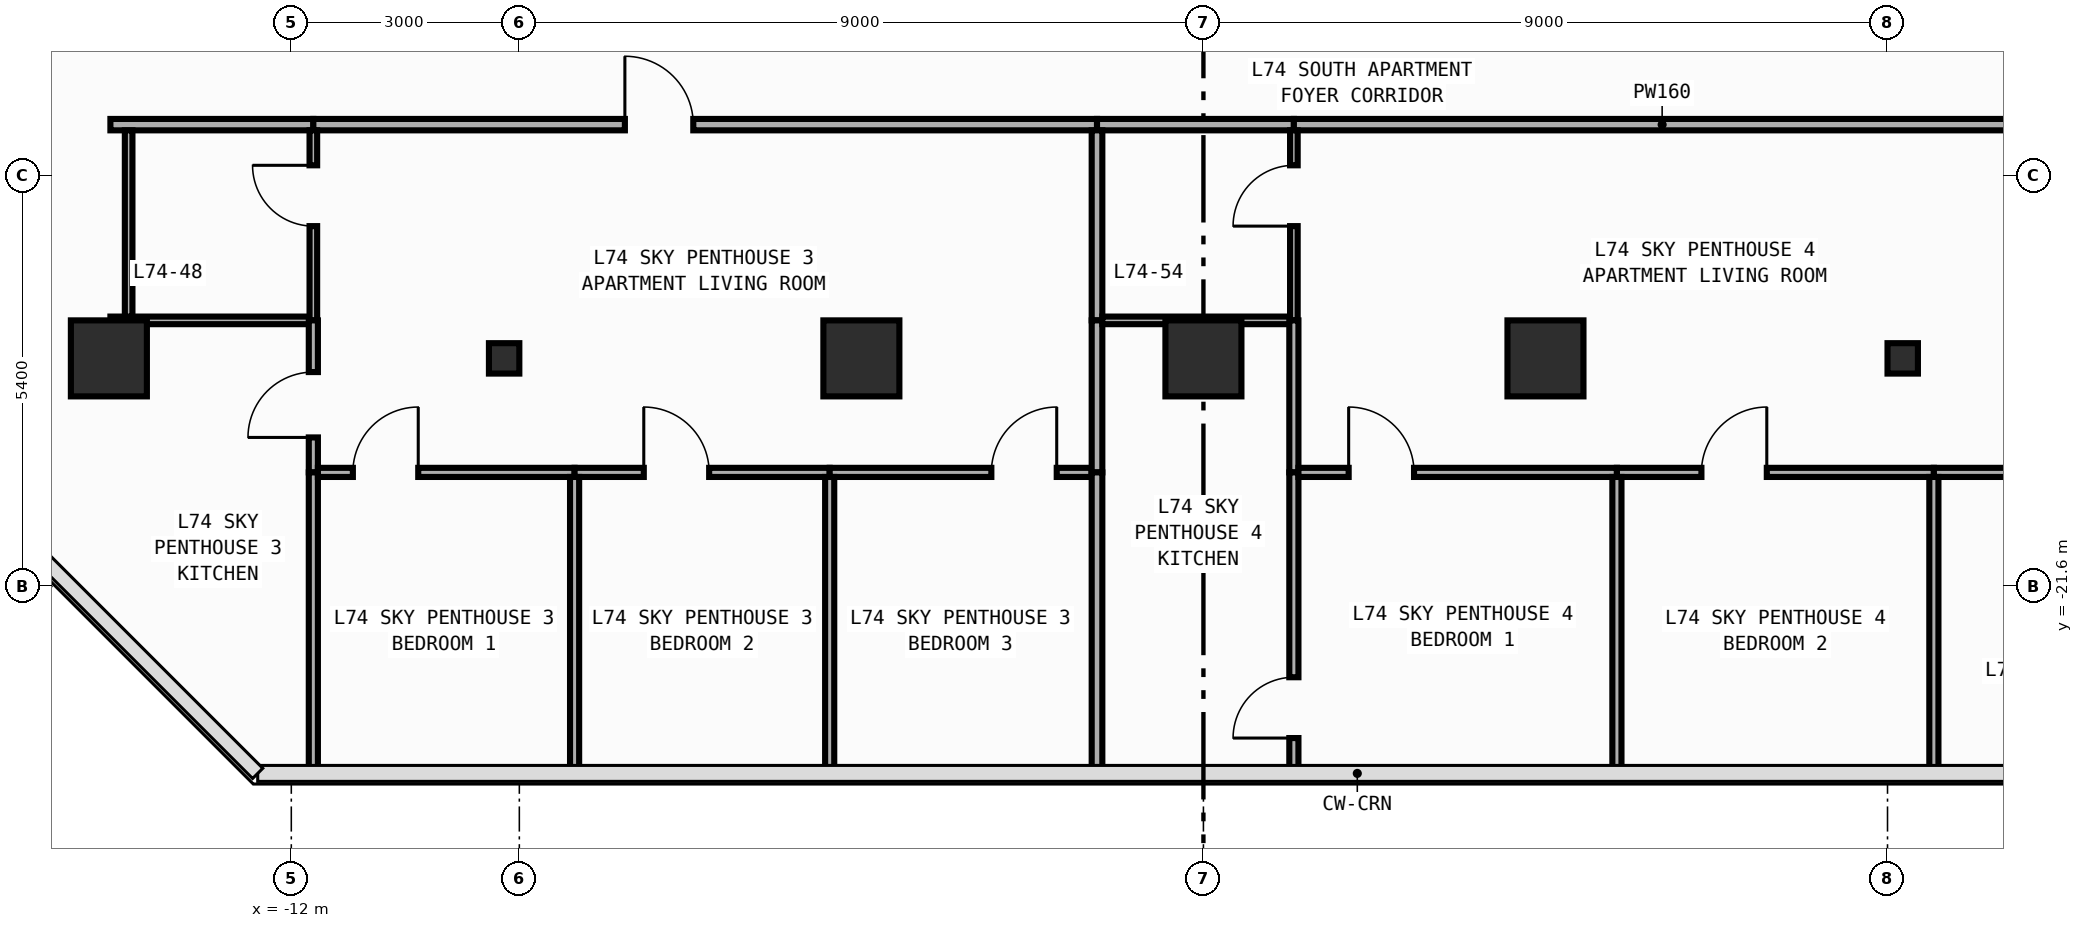
"""IFC4 building model, lengths in metres.
Left out: names, types, materials, properties, quantities, classifications, styles, units other than length and angle.
Written with IfcOpenShell. Run it as: python <this file> out.ifc"""

import sys

from ifc_helpers import new_model, si_unit, direction, frame, frame_2d, origin, origin_2d, place, context, subcontext, project, spatial, rectangle, circle, i_section, extrude, element, fill, save


model = new_model("IFC4")
c1 = context("Model", 3, precision=1e-05, world=origin(), true_north=direction((0.0, 1.0)))
c2 = subcontext(c1, "Body", "Model", "MODEL_VIEW")
j1 = project(units=[si_unit("LENGTHUNIT", "METRE"), si_unit("PLANEANGLEUNIT", "RADIAN")], contexts=[c1])
p1 = place(None, origin())
s1 = spatial("IfcSite", under=j1, at=p1, CompositionType="ELEMENT")
p2 = place(p1, origin())
s2 = spatial("IfcBuilding", under=s1, at=p2, CompositionType="ELEMENT")
p3 = place(p2, frame((0.0, 0.0, 308.0)))
s3 = spatial("IfcBuildingStorey", under=s2, at=p3, CompositionType="ELEMENT", Elevation=308.0)
for number, where, z_axis, x_axis in (
    (1, (-9.2, -18.6, 0.0), (0.0, 0.0, 1.0), (1.0, 0.0, 0.0)),
    (2, (9.2, -18.6, 0.0), (0.0, 0.0, 1.0), (1.0, 0.0, 0.0)),
):
    element("IfcColumn", number, at=place(p3, frame(where, z_axis=z_axis, x_axis=x_axis)), inside=s3, PredefinedType="COLUMN", context=c2, shape_type="SweptSolid", body=[
        extrude(i_section(OverallWidth=0.4, OverallDepth=0.4, WebThickness=0.013, FlangeThickness=0.021, FilletRadius=0.022, at=origin_2d()), origin(), (0.0, 0.0, 1.0), 3.8),
    ])
for number, where, z_axis, x_axis in (
    (3, (-14.4, -18.6, 0.0), (0.0, 0.0, 1.0), (1.0, 0.0, 0.0)),
    (4, (-4.5, -18.6, 0.0), (0.0, 0.0, 1.0), (1.0, 0.0, 0.0)),
    (5, (0.0, -18.6, 0.0), (0.0, 0.0, 1.0), (1.0, 0.0, 0.0)),
    (6, (4.5, -18.6, 0.0), (0.0, 0.0, 1.0), (1.0, 0.0, 0.0)),
):
    element("IfcColumn", number, at=place(p3, frame(where, z_axis=z_axis, x_axis=x_axis)), inside=s3, PredefinedType="COLUMN", context=c2, shape_type="SweptSolid", body=[
        extrude(circle(Radius=0.5, at=origin_2d()), origin(), (0.0, 0.0, 1.0), 3.8),
    ])
p4 = place(p3, frame((-14.38, -15.525, 0.0), z_axis=(0.0, 0.0, 1.0), x_axis=(1.0, 0.0, 0.0)))
e7 = element("IfcWall", 7, at=p4, inside=s3, PredefinedType="PARTITIONING", context=c2, shape_type="SweptSolid", body=[
    extrude(rectangle(XDim=2.67, YDim=0.15, at=frame_2d((1.335, 0.0))), origin(), (0.0, 0.0, 1.0), 3.54),
])
p5 = place(p3, frame((-11.71, -15.525, 0.0), z_axis=(0.0, 0.0, 1.0), x_axis=(1.0, 0.0, 0.0)))
e8 = element("IfcWall", 8, at=p5, inside=s3, PredefinedType="PARTITIONING", context=c2, shape_type="SweptSolid", body=[
    extrude(rectangle(XDim=10.31, YDim=0.15, at=frame_2d((5.155, 0.0))), origin(), (0.0, 0.0, 1.0), 3.54),
])
p6 = place(p5, frame((4.099, 0.0, 0.0)))
e9 = element("IfcOpeningElement", 9, at=p6, cuts=e8, PredefinedType="OPENING", context=c2, shape_type="SweptSolid", body=[
    extrude(rectangle(XDim=0.9, YDim=2.15, at=frame_2d((0.45, 1.075))), frame((0.0, 0.085, 0.0), z_axis=(0.0, -1.0, 0.0), x_axis=(1.0, 0.0, 0.0)), (0.0, 0.0, 1.0), 0.17),
])
p7 = place(p3, frame((-1.4, -15.525, 0.0), z_axis=(0.0, 0.0, 1.0), x_axis=(1.0, 0.0, 0.0)))
e10 = element("IfcWall", 10, at=p7, inside=s3, PredefinedType="PARTITIONING", context=c2, shape_type="SweptSolid", body=[
    extrude(rectangle(XDim=2.59, YDim=0.15, at=frame_2d((1.295, 0.0))), origin(), (0.0, 0.0, 1.0), 3.54),
])
p8 = place(p3, frame((1.19, -15.525, 0.0), z_axis=(0.0, 0.0, 1.0), x_axis=(1.0, 0.0, 0.0)))
e11 = element("IfcWall", 11, at=p8, inside=s3, PredefinedType="PARTITIONING", context=c2, shape_type="SweptSolid", body=[
    extrude(rectangle(XDim=11.05, YDim=0.15, at=frame_2d((5.525, 0.0))), origin(), (0.0, 0.0, 1.0), 3.54),
])
p9 = place(p8, frame((9.69, 0.0, 0.0)))
e12 = element("IfcOpeningElement", 12, at=p9, cuts=e11, PredefinedType="OPENING", context=c2, shape_type="SweptSolid", body=[
    extrude(rectangle(XDim=0.9, YDim=2.15, at=frame_2d((0.45, 1.075))), frame((0.0, 0.085, 0.0), z_axis=(0.0, -1.0, 0.0), x_axis=(1.0, 0.0, 0.0)), (0.0, 0.0, 1.0), 0.17),
])
p10 = place(p3, frame((-14.38, -18.1, 0.0), z_axis=(0.0, 0.0, 1.0), x_axis=(1.0, 0.0, 0.0)))
e13 = element("IfcWall", 13, at=p10, inside=s3, PredefinedType="PARTITIONING", context=c2, shape_type="SweptSolid", body=[
    extrude(rectangle(XDim=2.62, YDim=0.1, at=frame_2d((1.31, 0.0))), origin(), (0.0, 0.0, 1.0), 3.54),
])
p11 = place(p3, frame((-11.71, -18.1, 0.0), z_axis=(0.0, 0.0, 1.0), x_axis=(0.0, 1.0, 0.0)))
e14 = element("IfcWall", 14, at=p11, inside=s3, PredefinedType="PARTITIONING", context=c2, shape_type="SweptSolid", body=[
    extrude(rectangle(XDim=2.5, YDim=0.1, at=frame_2d((1.25, 0.0))), origin(), (0.0, 0.0, 1.0), 3.54),
])
p12 = place(p11, frame((1.24, 0.0, 0.0)))
e15 = element("IfcOpeningElement", 15, at=p12, cuts=e14, PredefinedType="OPENING", context=c2, shape_type="SweptSolid", body=[
    extrude(rectangle(XDim=0.8, YDim=2.1, at=frame_2d((0.4, 1.05))), frame((0.0, 0.06, 0.0), z_axis=(0.0, -1.0, 0.0), x_axis=(1.0, 0.0, 0.0)), (0.0, 0.0, 1.0), 0.12),
])
p13 = place(p3, frame((-11.71, -20.1, 0.0), z_axis=(0.0, 0.0, 1.0), x_axis=(0.0, 1.0, 0.0)))
e16 = element("IfcWall", 16, at=p13, inside=s3, PredefinedType="PARTITIONING", context=c2, shape_type="SweptSolid", body=[
    extrude(rectangle(XDim=2.0, YDim=0.12, at=frame_2d((1.0, 0.0))), origin(), (0.0, 0.0, 1.0), 3.54),
])
p14 = place(p13, frame((0.46, 0.0, 0.0)))
e17 = element("IfcOpeningElement", 17, at=p14, cuts=e16, PredefinedType="OPENING", context=c2, shape_type="SweptSolid", body=[
    extrude(rectangle(XDim=0.86, YDim=2.15, at=frame_2d((0.43, 1.075))), frame((0.0, 0.07, 0.0), z_axis=(0.0, -1.0, 0.0), x_axis=(1.0, 0.0, 0.0)), (0.0, 0.0, 1.0), 0.14),
])
p15 = place(p3, frame((-11.71, -24.055, 0.0), z_axis=(0.0, 0.0, 1.0), x_axis=(0.0, 1.0, 0.0)))
e18 = element("IfcWall", 18, at=p15, inside=s3, PredefinedType="PARTITIONING", context=c2, shape_type="SweptSolid", body=[
    extrude(rectangle(XDim=3.955, YDim=0.12, at=frame_2d((1.978, 0.0))), origin(), (0.0, 0.0, 1.0), 3.54),
])
p16 = place(p3, frame((-11.65, -20.1, 0.0), z_axis=(0.0, 0.0, 1.0), x_axis=(1.0, 0.0, 0.0)))
e19 = element("IfcWall", 19, at=p16, inside=s3, PredefinedType="PARTITIONING", context=c2, shape_type="SweptSolid", body=[
    extrude(rectangle(XDim=3.377, YDim=0.12, at=frame_2d((1.688, 0.0))), origin(), (0.0, 0.0, 1.0), 3.54),
])
p17 = place(p16, frame((0.46, 0.0, 0.0)))
e20 = element("IfcOpeningElement", 20, at=p17, cuts=e19, PredefinedType="OPENING", context=c2, shape_type="SweptSolid", body=[
    extrude(rectangle(XDim=0.86, YDim=2.15, at=frame_2d((0.43, 1.075))), frame((0.0, 0.07, 0.0), z_axis=(0.0, -1.0, 0.0), x_axis=(1.0, 0.0, 0.0)), (0.0, 0.0, 1.0), 0.14),
])
p18 = place(p3, frame((-8.273, -20.1, 0.0), z_axis=(0.0, 0.0, 1.0), x_axis=(1.0, 0.0, 0.0)))
e21 = element("IfcWall", 21, at=p18, inside=s3, PredefinedType="PARTITIONING", context=c2, shape_type="SweptSolid", body=[
    extrude(rectangle(XDim=3.356, YDim=0.12, at=frame_2d((1.678, 0.0))), origin(), (0.0, 0.0, 1.0), 3.54),
])
p19 = place(p18, frame((0.91, 0.0, 0.0)))
e22 = element("IfcOpeningElement", 22, at=p19, cuts=e21, PredefinedType="OPENING", context=c2, shape_type="SweptSolid", body=[
    extrude(rectangle(XDim=0.86, YDim=2.15, at=frame_2d((0.43, 1.075))), frame((0.0, 0.07, 0.0), z_axis=(0.0, -1.0, 0.0), x_axis=(1.0, 0.0, 0.0)), (0.0, 0.0, 1.0), 0.14),
])
p20 = place(p3, frame((-4.917, -20.1, 0.0), z_axis=(0.0, 0.0, 1.0), x_axis=(1.0, 0.0, 0.0)))
e23 = element("IfcWall", 23, at=p20, inside=s3, PredefinedType="PARTITIONING", context=c2, shape_type="SweptSolid", body=[
    extrude(rectangle(XDim=3.447, YDim=0.12, at=frame_2d((1.724, 0.0))), origin(), (0.0, 0.0, 1.0), 3.54),
])
p21 = place(p20, frame((2.127, 0.0, 0.0)))
e24 = element("IfcOpeningElement", 24, at=p21, cuts=e23, PredefinedType="OPENING", context=c2, shape_type="SweptSolid", body=[
    extrude(rectangle(XDim=0.86, YDim=2.15, at=frame_2d((0.43, 1.075))), frame((0.0, 0.07, 0.0), z_axis=(0.0, -1.0, 0.0), x_axis=(1.0, 0.0, 0.0)), (0.0, 0.0, 1.0), 0.14),
])
p22 = place(p3, frame((-1.4, -18.1, 0.0), z_axis=(0.0, 0.0, 1.0), x_axis=(0.0, 1.0, 0.0)))
e25 = element("IfcWall", 25, at=p22, inside=s3, PredefinedType="PARTITIONING", context=c2, shape_type="SweptSolid", body=[
    extrude(rectangle(XDim=2.5, YDim=0.14, at=frame_2d((1.25, 0.0))), origin(), (0.0, 0.0, 1.0), 3.54),
])
p23 = place(p3, frame((-1.4, -20.1, 0.0), z_axis=(0.0, 0.0, 1.0), x_axis=(0.0, 1.0, 0.0)))
e26 = element("IfcWall", 26, at=p23, inside=s3, PredefinedType="PARTITIONING", context=c2, shape_type="SweptSolid", body=[
    extrude(rectangle(XDim=2.0, YDim=0.14, at=frame_2d((1.0, 0.0))), origin(), (0.0, 0.0, 1.0), 3.54),
])
for number, where, z_axis, x_axis in (
    (27, (-8.273, -24.055, 0.0), (0.0, 0.0, 1.0), (0.0, 1.0, 0.0)),
    (28, (-4.917, -24.055, 0.0), (0.0, 0.0, 1.0), (0.0, 1.0, 0.0)),
):
    element("IfcWall", number, at=place(p3, frame(where, z_axis=z_axis, x_axis=x_axis)), inside=s3, PredefinedType="PARTITIONING", context=c2, shape_type="SweptSolid", body=[
        extrude(rectangle(XDim=3.895, YDim=0.12, at=frame_2d((1.948, 0.0))), origin(), (0.0, 0.0, 1.0), 3.54),
    ])
p24 = place(p3, frame((-1.4, -24.055, 0.0), z_axis=(0.0, 0.0, 1.0), x_axis=(0.0, 1.0, 0.0)))
e29 = element("IfcWall", 29, at=p24, inside=s3, PredefinedType="PARTITIONING", context=c2, shape_type="SweptSolid", body=[
    extrude(rectangle(XDim=3.955, YDim=0.14, at=frame_2d((1.978, 0.0))), origin(), (0.0, 0.0, 1.0), 3.54),
])
p25 = place(p3, frame((-1.33, -18.1, 0.0), z_axis=(0.0, 0.0, 1.0), x_axis=(1.0, 0.0, 0.0)))
e30 = element("IfcWall", 30, at=p25, inside=s3, PredefinedType="PARTITIONING", context=c2, shape_type="SweptSolid", body=[
    extrude(rectangle(XDim=2.47, YDim=0.1, at=frame_2d((1.235, 0.0))), origin(), (0.0, 0.0, 1.0), 3.54),
])
p26 = place(p3, frame((1.19, -18.1, 0.0), z_axis=(0.0, 0.0, 1.0), x_axis=(0.0, 1.0, 0.0)))
e31 = element("IfcWall", 31, at=p26, inside=s3, PredefinedType="PARTITIONING", context=c2, shape_type="SweptSolid", body=[
    extrude(rectangle(XDim=2.5, YDim=0.1, at=frame_2d((1.25, 0.0))), origin(), (0.0, 0.0, 1.0), 3.54),
])
p27 = place(p26, frame((1.24, 0.0, 0.0)))
e32 = element("IfcOpeningElement", 32, at=p27, cuts=e31, PredefinedType="OPENING", context=c2, shape_type="SweptSolid", body=[
    extrude(rectangle(XDim=0.8, YDim=2.1, at=frame_2d((0.4, 1.05))), frame((0.0, 0.06, 0.0), z_axis=(0.0, -1.0, 0.0), x_axis=(1.0, 0.0, 0.0)), (0.0, 0.0, 1.0), 0.12),
])
p28 = place(p3, frame((1.19, -20.1, 0.0), z_axis=(0.0, 0.0, 1.0), x_axis=(0.0, 1.0, 0.0)))
e33 = element("IfcWall", 33, at=p28, inside=s3, PredefinedType="PARTITIONING", context=c2, shape_type="SweptSolid", body=[
    extrude(rectangle(XDim=2.0, YDim=0.12, at=frame_2d((1.0, 0.0))), origin(), (0.0, 0.0, 1.0), 3.54),
])
p29 = place(p3, frame((1.19, -24.055, 0.0), z_axis=(0.0, 0.0, 1.0), x_axis=(0.0, 1.0, 0.0)))
e34 = element("IfcWall", 34, at=p29, inside=s3, PredefinedType="PARTITIONING", context=c2, shape_type="SweptSolid", body=[
    extrude(rectangle(XDim=3.955, YDim=0.12, at=frame_2d((1.978, 0.0))), origin(), (0.0, 0.0, 1.0), 3.54),
])
p30 = place(p29, frame((0.46, 0.0, 0.0)))
e35 = element("IfcOpeningElement", 35, at=p30, cuts=e34, PredefinedType="OPENING", context=c2, shape_type="SweptSolid", body=[
    extrude(rectangle(XDim=0.8, YDim=2.1, at=frame_2d((0.4, 1.05))), frame((0.0, 0.07, 0.0), z_axis=(0.0, -1.0, 0.0), x_axis=(1.0, 0.0, 0.0)), (0.0, 0.0, 1.0), 0.14),
])
p31 = place(p3, frame((1.25, -20.1, 0.0), z_axis=(0.0, 0.0, 1.0), x_axis=(1.0, 0.0, 0.0)))
e36 = element("IfcWall", 36, at=p31, inside=s3, PredefinedType="PARTITIONING", context=c2, shape_type="SweptSolid", body=[
    extrude(rectangle(XDim=4.19, YDim=0.12, at=frame_2d((2.095, 0.0))), origin(), (0.0, 0.0, 1.0), 3.54),
])
p32 = place(p31, frame((0.661, 0.0, 0.0)))
e37 = element("IfcOpeningElement", 37, at=p32, cuts=e36, PredefinedType="OPENING", context=c2, shape_type="SweptSolid", body=[
    extrude(rectangle(XDim=0.86, YDim=2.15, at=frame_2d((0.43, 1.075))), frame((0.0, 0.07, 0.0), z_axis=(0.0, -1.0, 0.0), x_axis=(1.0, 0.0, 0.0)), (0.0, 0.0, 1.0), 0.14),
])
p33 = place(p3, frame((5.44, -20.1, 0.0), z_axis=(0.0, 0.0, 1.0), x_axis=(1.0, 0.0, 0.0)))
e38 = element("IfcWall", 38, at=p33, inside=s3, PredefinedType="PARTITIONING", context=c2, shape_type="SweptSolid", body=[
    extrude(rectangle(XDim=4.17, YDim=0.12, at=frame_2d((2.085, 0.0))), origin(), (0.0, 0.0, 1.0), 3.54),
])
p34 = place(p33, frame((1.112, 0.0, 0.0)))
e39 = element("IfcOpeningElement", 39, at=p34, cuts=e38, PredefinedType="OPENING", context=c2, shape_type="SweptSolid", body=[
    extrude(rectangle(XDim=0.86, YDim=2.15, at=frame_2d((0.43, 1.075))), frame((0.0, 0.07, 0.0), z_axis=(0.0, -1.0, 0.0), x_axis=(1.0, 0.0, 0.0)), (0.0, 0.0, 1.0), 0.14),
])
p35 = place(p3, frame((9.61, -20.1, 0.0), z_axis=(0.0, 0.0, 1.0), x_axis=(1.0, 0.0, 0.0)))
e40 = element("IfcWall", 40, at=p35, inside=s3, PredefinedType="PARTITIONING", context=c2, shape_type="SweptSolid", body=[
    extrude(rectangle(XDim=4.31, YDim=0.12, at=frame_2d((2.155, 0.0))), origin(), (0.0, 0.0, 1.0), 3.54),
])
p36 = place(p35, frame((1.303, 0.0, 0.0)))
e41 = element("IfcOpeningElement", 41, at=p36, cuts=e40, PredefinedType="OPENING", context=c2, shape_type="SweptSolid", body=[
    extrude(rectangle(XDim=0.86, YDim=2.15, at=frame_2d((0.43, 1.075))), frame((0.0, 0.07, 0.0), z_axis=(0.0, -1.0, 0.0), x_axis=(1.0, 0.0, 0.0)), (0.0, 0.0, 1.0), 0.14),
])
for number, where, z_axis, x_axis in (
    (42, (5.44, -24.055, 0.0), (0.0, 0.0, 1.0), (0.0, 1.0, 0.0)),
    (43, (9.61, -24.055, 0.0), (0.0, 0.0, 1.0), (0.0, 1.0, 0.0)),
):
    element("IfcWall", number, at=place(p3, frame(where, z_axis=z_axis, x_axis=x_axis)), inside=s3, PredefinedType="PARTITIONING", context=c2, shape_type="SweptSolid", body=[
        extrude(rectangle(XDim=3.895, YDim=0.12, at=frame_2d((1.948, 0.0))), origin(), (0.0, 0.0, 1.0), 3.54),
    ])
p37 = place(p3, frame((-14.14, -18.05, 0.0), z_axis=(0.0, 0.0, 1.0), x_axis=(0.0, 1.0, 0.0)))
e44 = element("IfcWall", 44, at=p37, inside=s3, PredefinedType="PARTITIONING", context=c2, shape_type="SweptSolid", body=[
    extrude(rectangle(XDim=2.45, YDim=0.1, at=frame_2d((1.225, 0.0))), origin(), (0.0, 0.0, 1.0), 2.64),
])
p38 = place(p6, origin())
e45 = element("IfcDoor", 45, at=p38, inside=s3, OperationType="SINGLE_SWING_LEFT", PredefinedType="DOOR", context=c2, shape_type="SweptSolid", body=[
    extrude(rectangle(XDim=0.9, YDim=2.15, at=frame_2d((0.45, 1.075))), frame((0.0, 0.025, 0.0), z_axis=(0.0, -1.0, 0.0), x_axis=(1.0, 0.0, 0.0)), (0.0, 0.0, 1.0), 0.05),
])
fill(e9, e45)
p39 = place(p12, origin())
e46 = element("IfcDoor", 46, at=p39, inside=s3, OperationType="SINGLE_SWING_RIGHT", PredefinedType="DOOR", context=c2, shape_type="SweptSolid", body=[
    extrude(rectangle(XDim=0.8, YDim=2.1, at=frame_2d((0.4, 1.05))), frame((0.0, 0.025, 0.0), z_axis=(0.0, -1.0, 0.0), x_axis=(1.0, 0.0, 0.0)), (0.0, 0.0, 1.0), 0.05),
])
fill(e15, e46)
p40 = place(p14, origin())
e47 = element("IfcDoor", 47, at=p40, inside=s3, OperationType="SINGLE_SWING_LEFT", PredefinedType="DOOR", context=c2, shape_type="SweptSolid", body=[
    extrude(rectangle(XDim=0.86, YDim=2.15, at=frame_2d((0.43, 1.075))), frame((0.0, 0.025, 0.0), z_axis=(0.0, -1.0, 0.0), x_axis=(1.0, 0.0, 0.0)), (0.0, 0.0, 1.0), 0.05),
])
fill(e17, e47)
p41 = place(p17, origin())
e48 = element("IfcDoor", 48, at=p41, inside=s3, OperationType="SINGLE_SWING_RIGHT", PredefinedType="DOOR", context=c2, shape_type="SweptSolid", body=[
    extrude(rectangle(XDim=0.86, YDim=2.15, at=frame_2d((0.43, 1.075))), frame((0.0, 0.025, 0.0), z_axis=(0.0, -1.0, 0.0), x_axis=(1.0, 0.0, 0.0)), (0.0, 0.0, 1.0), 0.05),
])
fill(e20, e48)
p42 = place(p19, origin())
e49 = element("IfcDoor", 49, at=p42, inside=s3, OperationType="SINGLE_SWING_LEFT", PredefinedType="DOOR", context=c2, shape_type="SweptSolid", body=[
    extrude(rectangle(XDim=0.86, YDim=2.15, at=frame_2d((0.43, 1.075))), frame((0.0, 0.025, 0.0), z_axis=(0.0, -1.0, 0.0), x_axis=(1.0, 0.0, 0.0)), (0.0, 0.0, 1.0), 0.05),
])
fill(e22, e49)
p43 = place(p21, origin())
e50 = element("IfcDoor", 50, at=p43, inside=s3, OperationType="SINGLE_SWING_RIGHT", PredefinedType="DOOR", context=c2, shape_type="SweptSolid", body=[
    extrude(rectangle(XDim=0.86, YDim=2.15, at=frame_2d((0.43, 1.075))), frame((0.0, 0.025, 0.0), z_axis=(0.0, -1.0, 0.0), x_axis=(1.0, 0.0, 0.0)), (0.0, 0.0, 1.0), 0.05),
])
fill(e24, e50)
p44 = place(p27, origin())
e51 = element("IfcDoor", 51, at=p44, inside=s3, OperationType="SINGLE_SWING_LEFT", PredefinedType="DOOR", context=c2, shape_type="SweptSolid", body=[
    extrude(rectangle(XDim=0.8, YDim=2.1, at=frame_2d((0.4, 1.05))), frame((0.0, 0.025, 0.0), z_axis=(0.0, -1.0, 0.0), x_axis=(1.0, 0.0, 0.0)), (0.0, 0.0, 1.0), 0.05),
])
fill(e32, e51)
p45 = place(p32, origin())
e52 = element("IfcDoor", 52, at=p45, inside=s3, OperationType="SINGLE_SWING_LEFT", PredefinedType="DOOR", context=c2, shape_type="SweptSolid", body=[
    extrude(rectangle(XDim=0.86, YDim=2.15, at=frame_2d((0.43, 1.075))), frame((0.0, 0.025, 0.0), z_axis=(0.0, -1.0, 0.0), x_axis=(1.0, 0.0, 0.0)), (0.0, 0.0, 1.0), 0.05),
])
fill(e37, e52)
p46 = place(p34, origin())
e53 = element("IfcDoor", 53, at=p46, inside=s3, OperationType="SINGLE_SWING_RIGHT", PredefinedType="DOOR", context=c2, shape_type="SweptSolid", body=[
    extrude(rectangle(XDim=0.86, YDim=2.15, at=frame_2d((0.43, 1.075))), frame((0.0, 0.025, 0.0), z_axis=(0.0, -1.0, 0.0), x_axis=(1.0, 0.0, 0.0)), (0.0, 0.0, 1.0), 0.05),
])
fill(e39, e53)
p47 = place(p30, origin())
e54 = element("IfcDoor", 54, at=p47, inside=s3, OperationType="SINGLE_SWING_LEFT", PredefinedType="DOOR", context=c2, shape_type="SweptSolid", body=[
    extrude(rectangle(XDim=0.8, YDim=2.1, at=frame_2d((0.4, 1.05))), frame((0.0, 0.025, 0.0), z_axis=(0.0, -1.0, 0.0), x_axis=(1.0, 0.0, 0.0)), (0.0, 0.0, 1.0), 0.05),
])
fill(e35, e54)
save(model, sys.argv[1])
